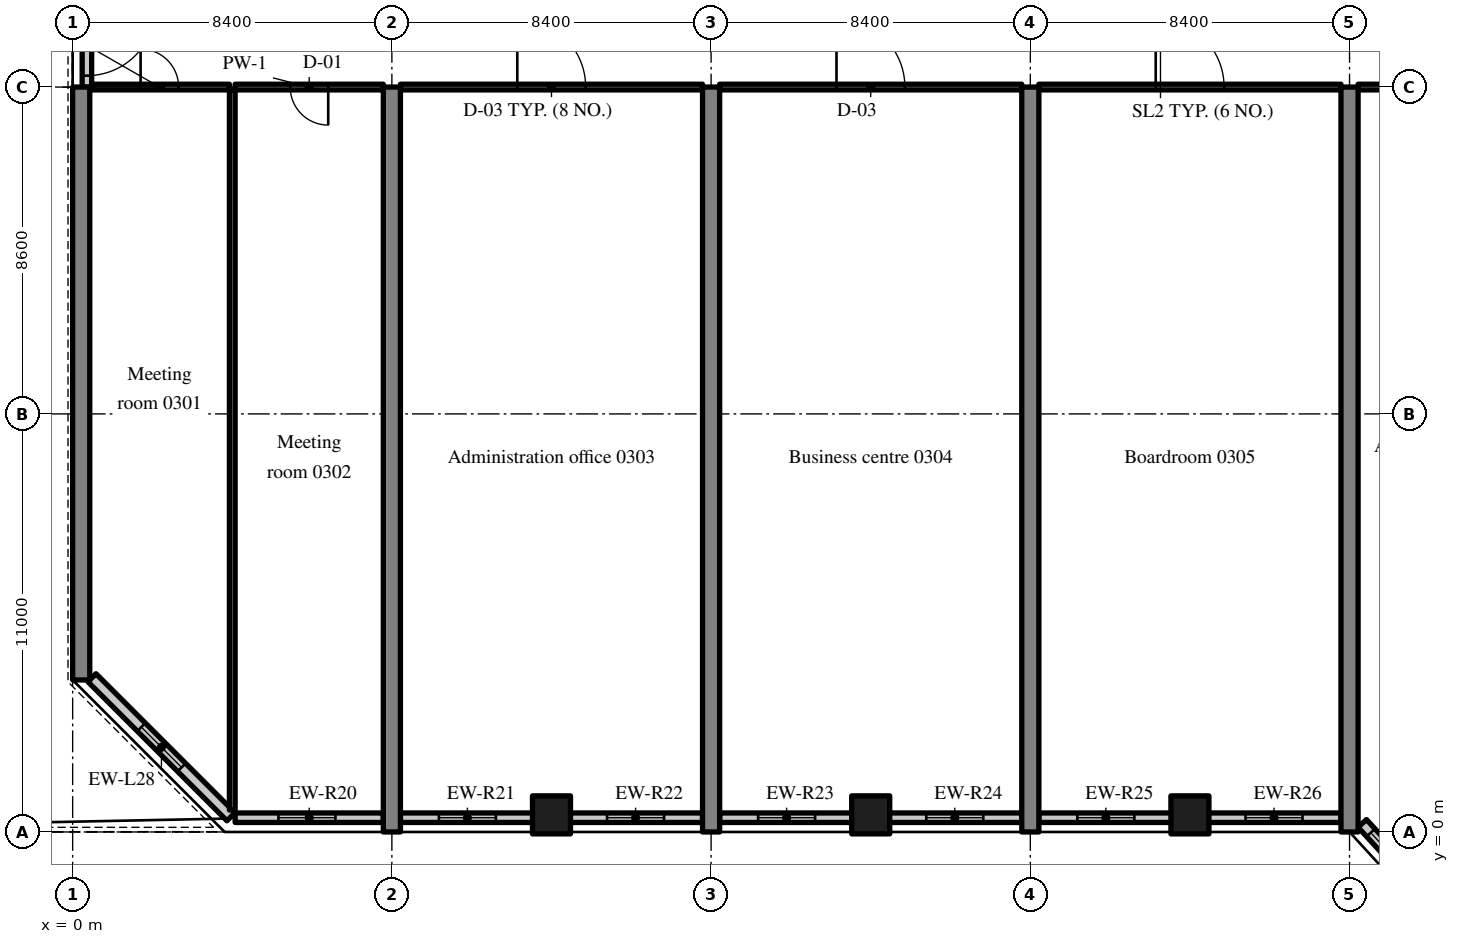
"""IFC4 building model, lengths in metres.
Left out: names, types, materials, properties, quantities, classifications, styles, units other than length and angle.
Written with IfcOpenShell. Run it as: python <this file> out.ifc"""

import sys

from ifc_helpers import new_model, si_unit, direction, frame, frame_2d, origin, origin_2d, place, context, subcontext, project, spatial, rectangle, extrude, source, transform, mapped, element, fill, save


model = new_model("IFC4")
c1 = context("Model", 3, precision=1e-05, world=origin(), true_north=direction((0.0, 1.0)))
c2 = subcontext(c1, "Body", "Model", "MODEL_VIEW")
j1 = project(units=[si_unit("LENGTHUNIT", "METRE"), si_unit("PLANEANGLEUNIT", "RADIAN")], contexts=[c1])
p1 = place(None, origin())
s1 = spatial("IfcSite", under=j1, at=p1, CompositionType="ELEMENT")
p2 = place(p1, origin())
s2 = spatial("IfcBuilding", under=s1, at=p2, CompositionType="ELEMENT")
p3 = place(p2, frame((0.0, 0.0, 18.0)))
s3 = spatial("IfcBuildingStorey", under=s2, at=p3, CompositionType="ELEMENT", Elevation=18.0)
m1 = source(origin(), c2, "Body", "SweptSolid", [
    extrude(rectangle(XDim=15.6, YDim=0.45, at=frame_2d((7.8, 0.0))), origin(), (0.0, 0.0, 1.0), 4.72),
])
p4 = place(p3, frame((0.225, 4.0, 0.0), z_axis=(0.0, 0.0, 1.0), x_axis=(0.0, 1.0, 0.0)))
e1 = element("IfcWall", 1, at=p4, inside=s3, PredefinedType="SHEAR", context=c2, shape_type="MappedRepresentation", body=[
    mapped(m1, transform((0.0, 0.0, 0.0), scale=1.0)),
])
m2 = source(origin(), c2, "Body", "SweptSolid", [
    extrude(rectangle(XDim=19.6, YDim=0.45, at=frame_2d((9.8, 0.0))), origin(), (0.0, 0.0, 1.0), 4.72),
])
for number, where, z_axis, x_axis in (
    (2, (8.4, 0.0, 0.0), (0.0, 0.0, 1.0), (0.0, 1.0, 0.0)),
    (3, (16.8, 0.0, 0.0), (0.0, 0.0, 1.0), (0.0, 1.0, 0.0)),
    (4, (25.2, 0.0, 0.0), (0.0, 0.0, 1.0), (0.0, 1.0, 0.0)),
    (5, (33.6, 0.0, 0.0), (0.0, 0.0, 1.0), (0.0, 1.0, 0.0)),
):
    element("IfcWall", number, at=place(p3, frame(where, z_axis=z_axis, x_axis=x_axis)), inside=s3, PredefinedType="SHEAR", context=c2, shape_type="MappedRepresentation", body=[
        mapped(m2, transform((0.0, 0.0, 0.0), scale=1.0)),
    ])
m3 = source(origin(), c2, "Body", "SweptSolid", [
    extrude(rectangle(XDim=1.0, YDim=1.0, at=origin_2d()), origin(), (0.0, 0.0, 1.0), 4.72),
])
for number, where, z_axis, x_axis in (
    (6, (12.6, 0.45, 0.0), (0.0, 0.0, 1.0), (1.0, 0.0, 0.0)),
    (7, (21.0, 0.45, 0.0), (0.0, 0.0, 1.0), (1.0, 0.0, 0.0)),
    (8, (29.4, 0.45, 0.0), (0.0, 0.0, 1.0), (1.0, 0.0, 0.0)),
):
    element("IfcColumn", number, at=place(p3, frame(where, z_axis=z_axis, x_axis=x_axis)), inside=s3, PredefinedType="COLUMN", context=c2, shape_type="MappedRepresentation", body=[
        mapped(m3, transform((0.0, 0.0, 0.0), scale=1.0)),
    ])
m4 = source(origin(), c2, "Body", "SweptSolid", [
    extrude(rectangle(XDim=2.4, YDim=0.25, at=frame_2d((1.2, 0.0))), origin(), (0.0, 0.0, 1.0), 3.82),
])
p5 = place(p3, frame((0.375, 22.0, 0.0), z_axis=(0.0, 0.0, 1.0), x_axis=(0.0, -1.0, 0.0)))
e9 = element("IfcWall", 9, at=p5, inside=s3, PredefinedType="SOLIDWALL", context=c2, shape_type="MappedRepresentation", body=[
    mapped(m4, transform((0.0, 0.0, 0.0), scale=1.0)),
])
m5 = source(origin(), c2, "Body", "SweptSolid", [
    extrude(rectangle(XDim=1.8, YDim=2.4, at=frame_2d((0.9, 1.2))), frame((0.0, 0.135, 0.0), z_axis=(0.0, -1.0, 0.0), x_axis=(1.0, 0.0, 0.0)), (0.0, 0.0, 1.0), 0.27),
])
p6 = place(p5, frame((0.3, 0.0, 0.0)))
e10 = element("IfcOpeningElement", 10, at=p6, cuts=e9, PredefinedType="OPENING", context=c2, shape_type="MappedRepresentation", body=[
    mapped(m5, transform((0.0, 0.0, 0.0), scale=1.0)),
])
m6 = source(origin(), c2, "Body", "SweptSolid", [
    extrude(rectangle(XDim=5.173, YDim=0.3, at=frame_2d((2.586, 0.0))), origin(), (0.0, 0.0, 1.0), 3.97),
])
p7 = place(p3, frame((0.508, 4.058, 0.0), z_axis=(0.0, 0.0, 1.0), x_axis=(0.707106781187, -0.707106781187, 0.0)))
e11 = element("IfcWall", 11, at=p7, inside=s3, PredefinedType="SOLIDWALL", context=c2, shape_type="MappedRepresentation", body=[
    mapped(m6, transform((0.0, 0.0, 0.0), scale=1.0)),
])
m7 = source(origin(), c2, "Body", "SweptSolid", [
    extrude(rectangle(XDim=1.5, YDim=1.5, at=frame_2d((0.75, 0.75))), frame((0.0, 0.16, 0.0), z_axis=(0.0, -1.0, 0.0), x_axis=(1.0, 0.0, 0.0)), (0.0, 0.0, 1.0), 0.32),
])
p8 = place(p7, frame((1.836, 0.0, 0.9)))
e12 = element("IfcOpeningElement", 12, at=p8, cuts=e11, PredefinedType="OPENING", context=c2, shape_type="MappedRepresentation", body=[
    mapped(m7, transform((0.0, 0.0, 0.0), scale=1.0)),
])
m8 = source(origin(), c2, "Body", "SweptSolid", [
    extrude(rectangle(XDim=3.9, YDim=0.25, at=frame_2d((1.95, 0.0))), origin(), (0.0, 0.0, 1.0), 3.97),
])
p9 = place(p3, frame((4.275, 0.375, 0.0), z_axis=(0.0, 0.0, 1.0), x_axis=(1.0, 0.0, 0.0)))
e13 = element("IfcWall", 13, at=p9, inside=s3, PredefinedType="SOLIDWALL", context=c2, shape_type="MappedRepresentation", body=[
    mapped(m8, transform((0.0, 0.0, 0.0), scale=1.0)),
])
m9 = source(origin(), c2, "Body", "SweptSolid", [
    extrude(rectangle(XDim=1.5, YDim=1.5, at=frame_2d((0.75, 0.75))), frame((0.0, 0.135, 0.0), z_axis=(0.0, -1.0, 0.0), x_axis=(1.0, 0.0, 0.0)), (0.0, 0.0, 1.0), 0.27),
])
p10 = place(p9, frame((1.14, 0.0, 0.9)))
e14 = element("IfcOpeningElement", 14, at=p10, cuts=e13, PredefinedType="OPENING", context=c2, shape_type="MappedRepresentation", body=[
    mapped(m9, transform((0.0, 0.0, 0.0), scale=1.0)),
])
m10 = source(origin(), c2, "Body", "SweptSolid", [
    extrude(rectangle(XDim=3.525, YDim=0.25, at=frame_2d((1.762, 0.0))), origin(), (0.0, 0.0, 1.0), 3.97),
])
p11 = place(p3, frame((8.625, 0.375, 0.0), z_axis=(0.0, 0.0, 1.0), x_axis=(1.0, 0.0, 0.0)))
e15 = element("IfcWall", 15, at=p11, inside=s3, PredefinedType="SOLIDWALL", context=c2, shape_type="MappedRepresentation", body=[
    mapped(m10, transform((0.0, 0.0, 0.0), scale=1.0)),
])
p12 = place(p11, frame((1.012, 0.0, 0.9)))
e16 = element("IfcOpeningElement", 16, at=p12, cuts=e15, PredefinedType="OPENING", context=c2, shape_type="MappedRepresentation", body=[
    mapped(m9, transform((0.0, 0.0, 0.0), scale=1.0)),
])
p13 = place(p3, frame((13.05, 0.375, 0.0), z_axis=(0.0, 0.0, 1.0), x_axis=(1.0, 0.0, 0.0)))
e17 = element("IfcWall", 17, at=p13, inside=s3, PredefinedType="SOLIDWALL", context=c2, shape_type="MappedRepresentation", body=[
    mapped(m10, transform((0.0, 0.0, 0.0), scale=1.0)),
])
p14 = place(p13, frame((1.012, 0.0, 0.9)))
e18 = element("IfcOpeningElement", 18, at=p14, cuts=e17, PredefinedType="OPENING", context=c2, shape_type="MappedRepresentation", body=[
    mapped(m9, transform((0.0, 0.0, 0.0), scale=1.0)),
])
m11 = source(origin(), c2, "Body", "SweptSolid", [
    extrude(rectangle(XDim=3.525, YDim=0.25, at=frame_2d((1.763, 0.0))), origin(), (0.0, 0.0, 1.0), 3.97),
])
p15 = place(p3, frame((17.025, 0.375, 0.0), z_axis=(0.0, 0.0, 1.0), x_axis=(1.0, 0.0, 0.0)))
e19 = element("IfcWall", 19, at=p15, inside=s3, PredefinedType="SOLIDWALL", context=c2, shape_type="MappedRepresentation", body=[
    mapped(m11, transform((0.0, 0.0, 0.0), scale=1.0)),
])
p16 = place(p15, frame((1.012, 0.0, 0.9)))
e20 = element("IfcOpeningElement", 20, at=p16, cuts=e19, PredefinedType="OPENING", context=c2, shape_type="MappedRepresentation", body=[
    mapped(m9, transform((0.0, 0.0, 0.0), scale=1.0)),
])
p17 = place(p3, frame((21.45, 0.375, 0.0), z_axis=(0.0, 0.0, 1.0), x_axis=(1.0, 0.0, 0.0)))
e21 = element("IfcWall", 21, at=p17, inside=s3, PredefinedType="SOLIDWALL", context=c2, shape_type="MappedRepresentation", body=[
    mapped(m11, transform((0.0, 0.0, 0.0), scale=1.0)),
])
p18 = place(p17, frame((1.012, 0.0, 0.9)))
e22 = element("IfcOpeningElement", 22, at=p18, cuts=e21, PredefinedType="OPENING", context=c2, shape_type="MappedRepresentation", body=[
    mapped(m9, transform((0.0, 0.0, 0.0), scale=1.0)),
])
p19 = place(p3, frame((25.425, 0.375, 0.0), z_axis=(0.0, 0.0, 1.0), x_axis=(1.0, 0.0, 0.0)))
e23 = element("IfcWall", 23, at=p19, inside=s3, PredefinedType="SOLIDWALL", context=c2, shape_type="MappedRepresentation", body=[
    mapped(m10, transform((0.0, 0.0, 0.0), scale=1.0)),
])
p20 = place(p19, frame((1.012, 0.0, 0.9)))
e24 = element("IfcOpeningElement", 24, at=p20, cuts=e23, PredefinedType="OPENING", context=c2, shape_type="MappedRepresentation", body=[
    mapped(m9, transform((0.0, 0.0, 0.0), scale=1.0)),
])
p21 = place(p3, frame((29.85, 0.375, 0.0), z_axis=(0.0, 0.0, 1.0), x_axis=(1.0, 0.0, 0.0)))
e25 = element("IfcWall", 25, at=p21, inside=s3, PredefinedType="SOLIDWALL", context=c2, shape_type="MappedRepresentation", body=[
    mapped(m10, transform((0.0, 0.0, 0.0), scale=1.0)),
])
p22 = place(p21, frame((1.012, 0.0, 0.9)))
e26 = element("IfcOpeningElement", 26, at=p22, cuts=e25, PredefinedType="OPENING", context=c2, shape_type="MappedRepresentation", body=[
    mapped(m9, transform((0.0, 0.0, 0.0), scale=1.0)),
])
m12 = source(origin(), c2, "Body", "SweptSolid", [
    extrude(rectangle(XDim=2.162, YDim=0.3, at=frame_2d((1.081, 0.0))), origin(), (0.0, 0.0, 1.0), 4.72),
])
p23 = place(p3, frame((33.936, 0.226, 0.0), z_axis=(0.0, 0.0, 1.0), x_axis=(0.67537173084, -0.737477474355, 0.0)))
e27 = element("IfcWall", 27, at=p23, inside=s3, PredefinedType="SOLIDWALL", context=c2, shape_type="MappedRepresentation", body=[
    mapped(m12, transform((0.0, 0.0, 0.0), scale=1.0)),
])
m13 = source(origin(), c2, "Body", "SweptSolid", [
    extrude(rectangle(XDim=1.5, YDim=2.0, at=frame_2d((0.75, 1.0))), frame((0.0, 0.16, 0.0), z_axis=(0.0, -1.0, 0.0), x_axis=(1.0, 0.0, 0.0)), (0.0, 0.0, 1.0), 0.32),
])
p24 = place(p23, frame((0.331, 0.0, 0.9)))
e28 = element("IfcOpeningElement", 28, at=p24, cuts=e27, PredefinedType="OPENING", context=c2, shape_type="MappedRepresentation", body=[
    mapped(m13, transform((0.0, 0.0, 0.0), scale=1.0)),
])
m14 = source(origin(), c2, "Body", "SweptSolid", [
    extrude(rectangle(XDim=3.625, YDim=0.15, at=frame_2d((1.812, 0.0))), origin(), (0.0, 0.0, 1.0), 4.02),
])
p25 = place(p3, frame((0.5, 19.6, 0.0), z_axis=(0.0, 0.0, 1.0), x_axis=(1.0, 0.0, 0.0)))
e29 = element("IfcWall", 29, at=p25, inside=s3, PredefinedType="PARTITIONING", context=c2, shape_type="MappedRepresentation", body=[
    mapped(m14, transform((0.0, 0.0, 0.0), scale=1.0)),
])
m15 = source(origin(), c2, "Body", "SweptSolid", [
    extrude(rectangle(XDim=1.0, YDim=2.1, at=frame_2d((0.5, 1.05))), frame((0.0, 0.085, 0.0), z_axis=(0.0, -1.0, 0.0), x_axis=(1.0, 0.0, 0.0)), (0.0, 0.0, 1.0), 0.17),
])
p26 = place(p25, frame((1.288, 0.0, 0.0)))
e30 = element("IfcOpeningElement", 30, at=p26, cuts=e29, PredefinedType="OPENING", context=c2, shape_type="MappedRepresentation", body=[
    mapped(m15, transform((0.0, 0.0, 0.0), scale=1.0)),
])
m16 = source(origin(), c2, "Body", "SweptSolid", [
    extrude(rectangle(XDim=3.9, YDim=0.15, at=frame_2d((1.95, 0.0))), origin(), (0.0, 0.0, 1.0), 4.02),
])
p27 = place(p3, frame((4.275, 19.6, 0.0), z_axis=(0.0, 0.0, 1.0), x_axis=(1.0, 0.0, 0.0)))
e31 = element("IfcWall", 31, at=p27, inside=s3, PredefinedType="PARTITIONING", context=c2, shape_type="MappedRepresentation", body=[
    mapped(m16, transform((0.0, 0.0, 0.0), scale=1.0)),
])
p28 = place(p27, frame((1.45, 0.0, 0.0)))
e32 = element("IfcOpeningElement", 32, at=p28, cuts=e31, PredefinedType="OPENING", context=c2, shape_type="MappedRepresentation", body=[
    mapped(m15, transform((0.0, 0.0, 0.0), scale=1.0)),
])
m17 = source(origin(), c2, "Body", "SweptSolid", [
    extrude(rectangle(XDim=18.947, YDim=0.15, at=frame_2d((9.474, 0.0))), origin(), (0.0, 0.0, 1.0), 4.72),
])
p29 = place(p3, frame((4.2, 0.578, 0.0), z_axis=(0.0, 0.0, 1.0), x_axis=(0.0, 1.0, 0.0)))
e33 = element("IfcWall", 33, at=p29, inside=s3, PredefinedType="PARTITIONING", context=c2, shape_type="MappedRepresentation", body=[
    mapped(m17, transform((0.0, 0.0, 0.0), scale=1.0)),
])
m18 = source(origin(), c2, "Body", "SweptSolid", [
    extrude(rectangle(XDim=7.95, YDim=0.15, at=frame_2d((3.975, 0.0))), origin(), (0.0, 0.0, 1.0), 4.02),
])
p30 = place(p3, frame((8.625, 19.6, 0.0), z_axis=(0.0, 0.0, 1.0), x_axis=(1.0, 0.0, 0.0)))
e34 = element("IfcWall", 34, at=p30, inside=s3, PredefinedType="PARTITIONING", context=c2, shape_type="MappedRepresentation", body=[
    mapped(m18, transform((0.0, 0.0, 0.0), scale=1.0)),
])
m19 = source(origin(), c2, "Body", "SweptSolid", [
    extrude(rectangle(XDim=1.8, YDim=2.1, at=frame_2d((0.9, 1.05))), frame((0.0, 0.085, 0.0), z_axis=(0.0, -1.0, 0.0), x_axis=(1.0, 0.0, 0.0)), (0.0, 0.0, 1.0), 0.17),
])
p31 = place(p30, frame((3.075, 0.0, 0.0)))
e35 = element("IfcOpeningElement", 35, at=p31, cuts=e34, PredefinedType="OPENING", context=c2, shape_type="MappedRepresentation", body=[
    mapped(m19, transform((0.0, 0.0, 0.0), scale=1.0)),
])
m20 = source(origin(), c2, "Body", "SweptSolid", [
    extrude(rectangle(XDim=7.95, YDim=0.15, at=frame_2d((3.975, 0.0))), origin(), (0.0, 0.0, 1.0), 4.02),
])
p32 = place(p3, frame((17.025, 19.6, 0.0), z_axis=(0.0, 0.0, 1.0), x_axis=(1.0, 0.0, 0.0)))
e36 = element("IfcWall", 36, at=p32, inside=s3, PredefinedType="PARTITIONING", context=c2, shape_type="MappedRepresentation", body=[
    mapped(m20, transform((0.0, 0.0, 0.0), scale=1.0)),
])
p33 = place(p32, frame((3.075, 0.0, 0.0)))
e37 = element("IfcOpeningElement", 37, at=p33, cuts=e36, PredefinedType="OPENING", context=c2, shape_type="MappedRepresentation", body=[
    mapped(m19, transform((0.0, 0.0, 0.0), scale=1.0)),
])
p34 = place(p3, frame((25.425, 19.6, 0.0), z_axis=(0.0, 0.0, 1.0), x_axis=(1.0, 0.0, 0.0)))
e38 = element("IfcWall", 38, at=p34, inside=s3, PredefinedType="PARTITIONING", context=c2, shape_type="MappedRepresentation", body=[
    mapped(m18, transform((0.0, 0.0, 0.0), scale=1.0)),
])
p35 = place(p34, frame((3.075, 0.0, 0.0)))
e39 = element("IfcOpeningElement", 39, at=p35, cuts=e38, PredefinedType="OPENING", context=c2, shape_type="MappedRepresentation", body=[
    mapped(m19, transform((0.0, 0.0, 0.0), scale=1.0)),
])
p36 = place(p3, frame((33.825, 19.6, 0.0), z_axis=(0.0, 0.0, 1.0), x_axis=(1.0, 0.0, 0.0)))
e40 = element("IfcWall", 40, at=p36, inside=s3, PredefinedType="PARTITIONING", context=c2, shape_type="MappedRepresentation", body=[
    mapped(m16, transform((0.0, 0.0, 0.0), scale=1.0)),
])
p37 = place(p36, frame((1.45, 0.0, 0.0)))
e41 = element("IfcOpeningElement", 41, at=p37, cuts=e40, PredefinedType="OPENING", context=c2, shape_type="MappedRepresentation", body=[
    mapped(m15, transform((0.0, 0.0, 0.0), scale=1.0)),
])
m21 = source(origin(), c2, "Body", "SweptSolid", [
    extrude(rectangle(XDim=1.8, YDim=2.4, at=frame_2d((0.9, 1.2))), frame((0.0, 0.025, 0.0), z_axis=(0.0, -1.0, 0.0), x_axis=(1.0, 0.0, 0.0)), (0.0, 0.0, 1.0), 0.05),
])
p38 = place(p6, origin())
e42 = element("IfcDoor", 42, at=p38, inside=s3, OperationType="DOUBLE_DOOR_SINGLE_SWING", PredefinedType="DOOR", context=c2, shape_type="MappedRepresentation", body=[
    mapped(m21, transform((0.0, 0.0, 0.0), scale=1.0)),
])
fill(e10, e42)
m22 = source(origin(), c2, "Body", "SweptSolid", [
    extrude(rectangle(XDim=1.5, YDim=1.5, at=frame_2d((0.75, 0.75))), frame((0.0, 0.03, 0.0), z_axis=(0.0, -1.0, 0.0), x_axis=(1.0, 0.0, 0.0)), (0.0, 0.0, 1.0), 0.06),
])
p39 = place(p8, origin())
e43 = element("IfcWindow", 43, at=p39, inside=s3, PartitioningType="SINGLE_PANEL", PredefinedType="WINDOW", context=c2, shape_type="MappedRepresentation", body=[
    mapped(m22, transform((0.0, 0.0, 0.0), scale=1.0)),
])
fill(e12, e43)
p40 = place(p10, origin())
e44 = element("IfcWindow", 44, at=p40, inside=s3, PartitioningType="SINGLE_PANEL", PredefinedType="WINDOW", context=c2, shape_type="MappedRepresentation", body=[
    mapped(m22, transform((0.0, 0.0, 0.0), scale=1.0)),
])
fill(e14, e44)
p41 = place(p12, origin())
e45 = element("IfcWindow", 45, at=p41, inside=s3, PartitioningType="SINGLE_PANEL", PredefinedType="WINDOW", context=c2, shape_type="MappedRepresentation", body=[
    mapped(m22, transform((0.0, 0.0, 0.0), scale=1.0)),
])
fill(e16, e45)
p42 = place(p14, origin())
e46 = element("IfcWindow", 46, at=p42, inside=s3, PartitioningType="SINGLE_PANEL", PredefinedType="WINDOW", context=c2, shape_type="MappedRepresentation", body=[
    mapped(m22, transform((0.0, 0.0, 0.0), scale=1.0)),
])
fill(e18, e46)
p43 = place(p16, origin())
e47 = element("IfcWindow", 47, at=p43, inside=s3, PartitioningType="SINGLE_PANEL", PredefinedType="WINDOW", context=c2, shape_type="MappedRepresentation", body=[
    mapped(m22, transform((0.0, 0.0, 0.0), scale=1.0)),
])
fill(e20, e47)
p44 = place(p18, origin())
e48 = element("IfcWindow", 48, at=p44, inside=s3, PartitioningType="SINGLE_PANEL", PredefinedType="WINDOW", context=c2, shape_type="MappedRepresentation", body=[
    mapped(m22, transform((0.0, 0.0, 0.0), scale=1.0)),
])
fill(e22, e48)
p45 = place(p20, origin())
e49 = element("IfcWindow", 49, at=p45, inside=s3, PartitioningType="SINGLE_PANEL", PredefinedType="WINDOW", context=c2, shape_type="MappedRepresentation", body=[
    mapped(m22, transform((0.0, 0.0, 0.0), scale=1.0)),
])
fill(e24, e49)
p46 = place(p22, origin())
e50 = element("IfcWindow", 50, at=p46, inside=s3, PartitioningType="SINGLE_PANEL", PredefinedType="WINDOW", context=c2, shape_type="MappedRepresentation", body=[
    mapped(m22, transform((0.0, 0.0, 0.0), scale=1.0)),
])
fill(e26, e50)
m23 = source(origin(), c2, "Body", "SweptSolid", [
    extrude(rectangle(XDim=1.5, YDim=2.0, at=frame_2d((0.75, 1.0))), frame((0.0, 0.03, 0.0), z_axis=(0.0, -1.0, 0.0), x_axis=(1.0, 0.0, 0.0)), (0.0, 0.0, 1.0), 0.06),
])
p47 = place(p24, origin())
e51 = element("IfcWindow", 51, at=p47, inside=s3, PartitioningType="SINGLE_PANEL", PredefinedType="WINDOW", context=c2, shape_type="MappedRepresentation", body=[
    mapped(m23, transform((0.0, 0.0, 0.0), scale=1.0)),
])
fill(e28, e51)
m24 = source(origin(), c2, "Body", "SweptSolid", [
    extrude(rectangle(XDim=1.0, YDim=2.1, at=frame_2d((0.5, 1.05))), frame((0.0, 0.025, 0.0), z_axis=(0.0, -1.0, 0.0), x_axis=(1.0, 0.0, 0.0)), (0.0, 0.0, 1.0), 0.05),
])
p48 = place(p26, origin())
e52 = element("IfcDoor", 52, at=p48, inside=s3, OperationType="SINGLE_SWING_LEFT", PredefinedType="DOOR", context=c2, shape_type="MappedRepresentation", body=[
    mapped(m24, transform((0.0, 0.0, 0.0), scale=1.0)),
])
fill(e30, e52)
p49 = place(p28, origin())
e53 = element("IfcDoor", 53, at=p49, inside=s3, OperationType="SINGLE_SWING_RIGHT", PredefinedType="DOOR", context=c2, shape_type="MappedRepresentation", body=[
    mapped(m24, transform((0.0, 0.0, 0.0), scale=1.0)),
])
fill(e32, e53)
m25 = source(origin(), c2, "Body", "SweptSolid", [
    extrude(rectangle(XDim=1.8, YDim=2.1, at=frame_2d((0.9, 1.05))), frame((0.0, 0.025, 0.0), z_axis=(0.0, -1.0, 0.0), x_axis=(1.0, 0.0, 0.0)), (0.0, 0.0, 1.0), 0.05),
])
p50 = place(p31, origin())
e54 = element("IfcDoor", 54, at=p50, inside=s3, OperationType="DOUBLE_DOOR_SINGLE_SWING", PredefinedType="DOOR", context=c2, shape_type="MappedRepresentation", body=[
    mapped(m25, transform((0.0, 0.0, 0.0), scale=1.0)),
])
fill(e35, e54)
p51 = place(p33, origin())
e55 = element("IfcDoor", 55, at=p51, inside=s3, OperationType="DOUBLE_DOOR_SINGLE_SWING", PredefinedType="DOOR", context=c2, shape_type="MappedRepresentation", body=[
    mapped(m25, transform((0.0, 0.0, 0.0), scale=1.0)),
])
fill(e37, e55)
p52 = place(p35, origin())
e56 = element("IfcDoor", 56, at=p52, inside=s3, OperationType="DOUBLE_DOOR_SINGLE_SWING", PredefinedType="DOOR", context=c2, shape_type="MappedRepresentation", body=[
    mapped(m25, transform((0.0, 0.0, 0.0), scale=1.0)),
])
fill(e39, e56)
save(model, sys.argv[1])
